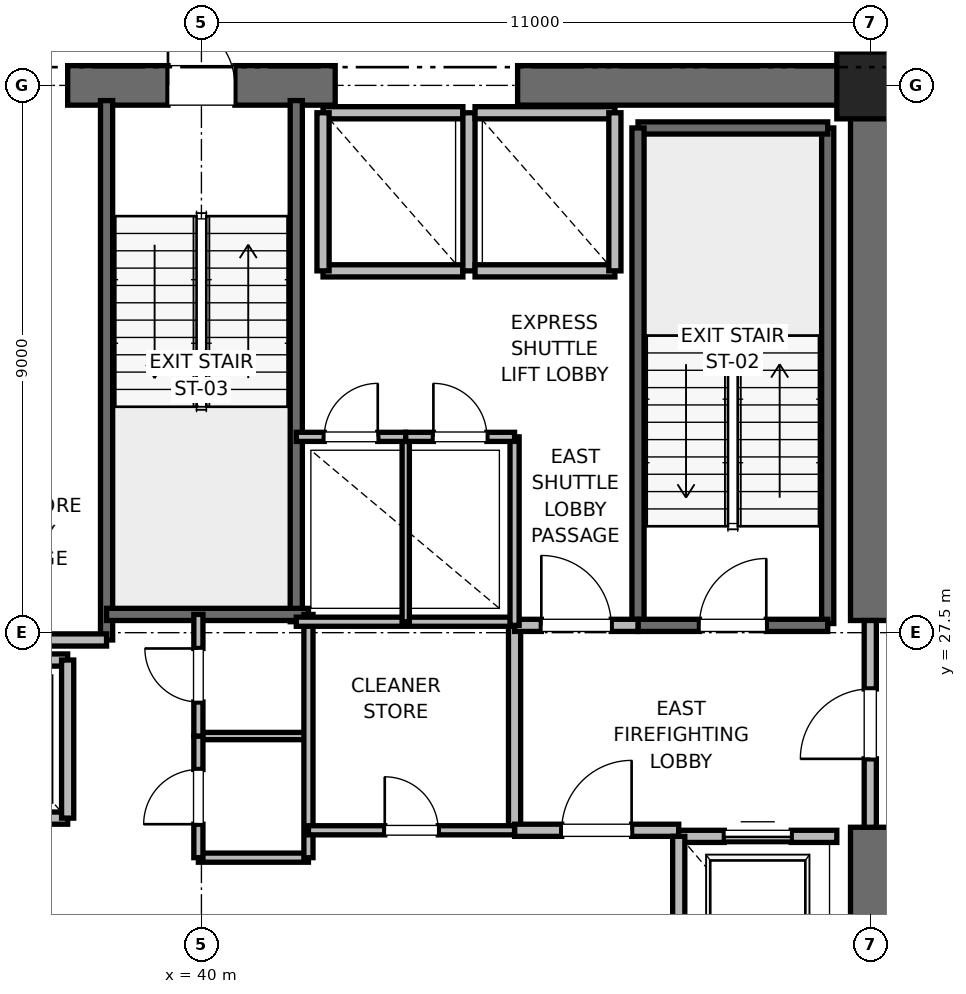
"""IFC4 building model, lengths in metres.
Left out: names, types, materials, properties, quantities, classifications, styles, units other than length and angle.
Written with IfcOpenShell. Run it as: python <this file> out.ifc"""

import sys

from ifc_helpers import new_model, si_unit, direction, frame, frame_2d, origin, origin_2d, place, context, subcontext, project, spatial, rectangle, extrude, element, fill, save


model = new_model("IFC4")
c1 = context("Model", 3, precision=1e-05, world=origin(), true_north=direction((0.0, 1.0)))
c2 = subcontext(c1, "Body", "Model", "MODEL_VIEW")
j1 = project(units=[si_unit("LENGTHUNIT", "METRE"), si_unit("PLANEANGLEUNIT", "RADIAN")], contexts=[c1])
p1 = place(None, origin())
s1 = spatial("IfcSite", under=j1, at=p1, CompositionType="ELEMENT")
p2 = place(p1, origin())
s2 = spatial("IfcBuilding", under=s1, at=p2, CompositionType="ELEMENT")
p3 = place(p2, frame((0.0, 0.0, 83.6)))
s3 = spatial("IfcBuildingStorey", under=s2, at=p3, CompositionType="ELEMENT", Elevation=83.6)
p4 = place(p3, frame((51.0, 36.5, 0.0), z_axis=(0.0, 0.0, 1.0), x_axis=(1.0, 0.0, 0.0)))
e1 = element("IfcColumn", 1, at=p4, inside=s3, PredefinedType="PILASTER", context=c2, shape_type="SweptSolid", body=[
    extrude(rectangle(XDim=1.1, YDim=1.1, at=origin_2d()), origin(), (0.0, 0.0, 1.0), 4.0),
])
p5 = place(p3, frame((37.8, 36.5, 0.0), z_axis=(0.0, 0.0, 1.0), x_axis=(1.0, 0.0, 0.0)))
e2 = element("IfcWall", 2, at=p5, inside=s3, PredefinedType="SHEAR", context=c2, shape_type="SweptSolid", body=[
    extrude(rectangle(XDim=4.4, YDim=0.65, at=frame_2d((2.2, 0.0))), origin(), (0.0, 0.0, 1.0), 3.76),
])
p6 = place(p5, frame((1.65, 0.0, 0.0)))
e3 = element("IfcOpeningElement", 3, at=p6, cuts=e2, PredefinedType="OPENING", context=c2, shape_type="SweptSolid", body=[
    extrude(rectangle(XDim=1.1, YDim=2.15, at=frame_2d((0.55, 1.075))), frame((0.0, 0.325, 0.0), z_axis=(0.0, -1.0, 0.0), x_axis=(1.0, 0.0, 0.0)), (0.0, 0.0, 1.0), 0.65),
])
for number, where, z_axis, x_axis in (
    (4, (45.2, 36.5, 0.0), (0.0, 0.0, 1.0), (1.0, 0.0, 0.0)),
    (5, (51.0, 18.5, 0.0), (0.0, 0.0, 1.0), (0.0, 1.0, 0.0)),
):
    element("IfcWall", number, at=place(p3, frame(where, z_axis=z_axis, x_axis=x_axis)), inside=s3, PredefinedType="SHEAR", context=c2, shape_type="SweptSolid", body=[
        extrude(rectangle(XDim=5.8, YDim=0.65, at=frame_2d((2.9, 0.0))), origin(), (0.0, 0.0, 1.0), 3.76),
    ])
p7 = place(p3, frame((51.0, 27.7, 0.0), z_axis=(0.0, 0.0, 1.0), x_axis=(0.0, 1.0, 0.0)))
e6 = element("IfcWall", 6, at=p7, inside=s3, PredefinedType="SHEAR", context=c2, shape_type="SweptSolid", body=[
    extrude(rectangle(XDim=8.8, YDim=0.65, at=frame_2d((4.4, 0.0))), origin(), (0.0, 0.0, 1.0), 3.76),
])
p8 = place(p3, frame((50.3, 27.65, 0.0), z_axis=(0.0, 0.0, 1.0), x_axis=(0.0, 1.0, 0.0)))
e7 = element("IfcWall", 7, at=p8, inside=s3, PredefinedType="SOLIDWALL", context=c2, shape_type="SweptSolid", body=[
    extrude(rectangle(XDim=8.15, YDim=0.2, at=frame_2d((4.075, 0.0))), origin(), (0.0, 0.0, 1.0), 3.76),
])
p9 = place(p3, frame((47.18, 35.8, 0.0), z_axis=(0.0, 0.0, 1.0), x_axis=(1.0, 0.0, 0.0)))
e8 = element("IfcWall", 8, at=p9, inside=s3, PredefinedType="SOLIDWALL", context=c2, shape_type="SweptSolid", body=[
    extrude(rectangle(XDim=3.12, YDim=0.2, at=frame_2d((1.56, 0.0))), origin(), (0.0, 0.0, 1.0), 3.76),
])
p10 = place(p3, frame((47.18, 27.62, 0.0), z_axis=(0.0, 0.0, 1.0), x_axis=(0.0, 1.0, 0.0)))
e9 = element("IfcWall", 9, at=p10, inside=s3, PredefinedType="SOLIDWALL", context=c2, shape_type="SweptSolid", body=[
    extrude(rectangle(XDim=8.18, YDim=0.2, at=frame_2d((4.09, 0.0))), origin(), (0.0, 0.0, 1.0), 3.76),
])
p11 = place(p3, frame((47.18, 27.62, 0.0), z_axis=(0.0, 0.0, 1.0), x_axis=(1.0, 0.0, 0.0)))
e10 = element("IfcWall", 10, at=p11, inside=s3, PredefinedType="SOLIDWALL", context=c2, shape_type="SweptSolid", body=[
    extrude(rectangle(XDim=3.12, YDim=0.2, at=frame_2d((1.56, 0.0))), origin(), (0.0, 0.0, 1.0), 3.76),
])
p12 = place(p11, frame((1.01, 0.0, 0.0)))
e11 = element("IfcOpeningElement", 11, at=p12, cuts=e10, PredefinedType="OPENING", context=c2, shape_type="SweptSolid", body=[
    extrude(rectangle(XDim=1.1, YDim=2.15, at=frame_2d((0.55, 1.075))), frame((0.0, 0.1, 0.0), z_axis=(0.0, -1.0, 0.0), x_axis=(1.0, 0.0, 0.0)), (0.0, 0.0, 1.0), 0.2),
])
p13 = place(p3, frame((38.44, 27.38, 0.0), z_axis=(0.0, 0.0, 1.0), x_axis=(0.0, 1.0, 0.0)))
e12 = element("IfcWall", 12, at=p13, inside=s3, PredefinedType="SOLIDWALL", context=c2, shape_type="SweptSolid", body=[
    extrude(rectangle(XDim=8.87, YDim=0.2, at=frame_2d((4.435, 0.0))), origin(), (0.0, 0.0, 1.0), 3.76),
])
p14 = place(p3, frame((41.56, 27.68, 0.0), z_axis=(0.0, 0.0, 1.0), x_axis=(0.0, 1.0, 0.0)))
e13 = element("IfcWall", 13, at=p14, inside=s3, PredefinedType="SOLIDWALL", context=c2, shape_type="SweptSolid", body=[
    extrude(rectangle(XDim=8.57, YDim=0.2, at=frame_2d((4.285, 0.0))), origin(), (0.0, 0.0, 1.0), 3.76),
])
p15 = place(p3, frame((38.44, 27.8, 0.0), z_axis=(0.0, 0.0, 1.0), x_axis=(1.0, 0.0, 0.0)))
e14 = element("IfcWall", 14, at=p15, inside=s3, PredefinedType="SOLIDWALL", context=c2, shape_type="SweptSolid", body=[
    extrude(rectangle(XDim=3.32, YDim=0.2, at=frame_2d((1.66, 0.0))), origin(), (0.0, 0.0, 1.0), 3.76),
])
p16 = place(p3, frame((32.82, 27.38, 0.0), z_axis=(0.0, 0.0, 1.0), x_axis=(1.0, 0.0, 0.0)))
e15 = element("IfcWall", 15, at=p16, inside=s3, PredefinedType="PARTITIONING", context=c2, shape_type="SweptSolid", body=[
    extrude(rectangle(XDim=5.62, YDim=0.2, at=frame_2d((2.81, 0.0))), origin(), (0.0, 0.0, 1.0), 3.76),
])
p17 = place(p3, frame((45.15, 24.25, 0.0), z_axis=(0.0, 0.0, 1.0), x_axis=(0.0, 1.0, 0.0)))
e16 = element("IfcWall", 16, at=p17, inside=s3, PredefinedType="PARTITIONING", context=c2, shape_type="SweptSolid", body=[
    extrude(rectangle(XDim=3.37, YDim=0.2, at=frame_2d((1.685, 0.0))), origin(), (0.0, 0.0, 1.0), 3.76),
])
p18 = place(p3, frame((45.15, 24.25, 0.0), z_axis=(0.0, 0.0, 1.0), x_axis=(1.0, 0.0, 0.0)))
e17 = element("IfcWall", 17, at=p18, inside=s3, PredefinedType="PARTITIONING", context=c2, shape_type="SweptSolid", body=[
    extrude(rectangle(XDim=2.7, YDim=0.2, at=frame_2d((1.35, 0.0))), origin(), (0.0, 0.0, 1.0), 3.76),
])
p19 = place(p18, frame((0.775, 0.0, 0.0)))
e18 = element("IfcOpeningElement", 18, at=p19, cuts=e17, PredefinedType="OPENING", context=c2, shape_type="SweptSolid", body=[
    extrude(rectangle(XDim=1.15, YDim=2.2, at=frame_2d((0.575, 1.1))), frame((0.0, 0.1, 0.0), z_axis=(0.0, -1.0, 0.0), x_axis=(1.0, 0.0, 0.0)), (0.0, 0.0, 1.0), 0.2),
])
p20 = place(p3, frame((45.15, 27.62, 0.0), z_axis=(0.0, 0.0, 1.0), x_axis=(1.0, 0.0, 0.0)))
e19 = element("IfcWall", 19, at=p20, inside=s3, PredefinedType="PARTITIONING", context=c2, shape_type="SweptSolid", body=[
    extrude(rectangle(XDim=2.03, YDim=0.2, at=frame_2d((1.015, 0.0))), origin(), (0.0, 0.0, 1.0), 3.76),
])
p21 = place(p20, frame((0.44, 0.0, 0.0)))
e20 = element("IfcOpeningElement", 20, at=p21, cuts=e19, PredefinedType="OPENING", context=c2, shape_type="SweptSolid", body=[
    extrude(rectangle(XDim=1.15, YDim=2.2, at=frame_2d((0.575, 1.1))), frame((0.0, 0.1, 0.0), z_axis=(0.0, -1.0, 0.0), x_axis=(1.0, 0.0, 0.0)), (0.0, 0.0, 1.0), 0.2),
])
p22 = place(p3, frame((51.0, 24.3, 0.0), z_axis=(0.0, 0.0, 1.0), x_axis=(0.0, 1.0, 0.0)))
e21 = element("IfcWall", 21, at=p22, inside=s3, PredefinedType="PARTITIONING", context=c2, shape_type="SweptSolid", body=[
    extrude(rectangle(XDim=3.4, YDim=0.2, at=frame_2d((1.7, 0.0))), origin(), (0.0, 0.0, 1.0), 2.54),
])
p23 = place(p22, frame((1.125, 0.0, 0.0)))
e22 = element("IfcOpeningElement", 22, at=p23, cuts=e21, PredefinedType="OPENING", context=c2, shape_type="SweptSolid", body=[
    extrude(rectangle(XDim=1.15, YDim=2.2, at=frame_2d((0.575, 1.1))), frame((0.0, 0.1, 0.0), z_axis=(0.0, -1.0, 0.0), x_axis=(1.0, 0.0, 0.0)), (0.0, 0.0, 1.0), 0.2),
])
p24 = place(p3, frame((50.45, 24.15, 0.0), z_axis=(0.0, 0.0, 1.0), x_axis=(-1.0, 0.0, 0.0)))
e23 = element("IfcWall", 23, at=p24, inside=s3, PredefinedType="SOLIDWALL", context=c2, shape_type="SweptSolid", body=[
    extrude(rectangle(XDim=2.6, YDim=0.2, at=frame_2d((1.3, 0.0))), origin(), (0.0, 0.0, 1.0), 2.54),
])
p25 = place(p24, frame((0.75, 0.0, 0.0)))
e24 = element("IfcOpeningElement", 24, at=p25, cuts=e23, PredefinedType="OPENING", context=c2, shape_type="SweptSolid", body=[
    extrude(rectangle(XDim=1.1, YDim=2.2, at=frame_2d((0.55, 1.1))), frame((0.0, 0.1, 0.0), z_axis=(0.0, -1.0, 0.0), x_axis=(1.0, 0.0, 0.0)), (0.0, 0.0, 1.0), 0.2),
])
p26 = place(p3, frame((47.85, 24.15, 0.0), z_axis=(0.0, 0.0, 1.0), x_axis=(0.0, -1.0, 0.0)))
e25 = element("IfcWall", 25, at=p26, inside=s3, PredefinedType="SOLIDWALL", context=c2, shape_type="SweptSolid", body=[
    extrude(rectangle(XDim=3.0, YDim=0.2, at=frame_2d((1.5, 0.0))), origin(), (0.0, 0.0, 1.0), 3.76),
])
p27 = place(p3, frame((35.5, 24.45, 0.0), z_axis=(0.0, 0.0, 1.0), x_axis=(1.0, 0.0, 0.0)))
e26 = element("IfcWall", 26, at=p27, inside=s3, PredefinedType="SOLIDWALL", context=c2, shape_type="SweptSolid", body=[
    extrude(rectangle(XDim=2.3, YDim=0.2, at=frame_2d((1.15, 0.0))), origin(), (0.0, 0.0, 1.0), 3.76),
])
p28 = place(p27, frame((0.6, 0.0, 0.0)))
e27 = element("IfcOpeningElement", 27, at=p28, cuts=e26, PredefinedType="OPENING", context=c2, shape_type="SweptSolid", body=[
    extrude(rectangle(XDim=1.1, YDim=2.2, at=frame_2d((0.55, 1.1))), frame((0.0, 0.1, 0.0), z_axis=(0.0, -1.0, 0.0), x_axis=(1.0, 0.0, 0.0)), (0.0, 0.0, 1.0), 0.2),
])
p29 = place(p3, frame((37.8, 27.05, 0.0), z_axis=(0.0, 0.0, 1.0), x_axis=(-1.0, 0.0, 0.0)))
e28 = element("IfcWall", 28, at=p29, inside=s3, PredefinedType="SOLIDWALL", context=c2, shape_type="SweptSolid", body=[
    extrude(rectangle(XDim=2.3, YDim=0.2, at=frame_2d((1.15, 0.0))), origin(), (0.0, 0.0, 1.0), 3.76),
])
p30 = place(p3, frame((37.8, 24.45, 0.0), z_axis=(0.0, 0.0, 1.0), x_axis=(0.0, 1.0, 0.0)))
e29 = element("IfcWall", 29, at=p30, inside=s3, PredefinedType="SOLIDWALL", context=c2, shape_type="SweptSolid", body=[
    extrude(rectangle(XDim=2.6, YDim=0.2, at=frame_2d((1.3, 0.0))), origin(), (0.0, 0.0, 1.0), 3.76),
])
p31 = place(p3, frame((42.0, 33.45, 0.0), z_axis=(0.0, 0.0, 1.0), x_axis=(1.0, 0.0, 0.0)))
e30 = element("IfcWall", 30, at=p31, inside=s3, PredefinedType="SOLIDWALL", context=c2, shape_type="SweptSolid", body=[
    extrude(rectangle(XDim=2.3, YDim=0.2, at=frame_2d((1.15, 0.0))), origin(), (0.0, 0.0, 1.0), 3.76),
])
p32 = place(p3, frame((44.3, 36.05, 0.0), z_axis=(0.0, 0.0, 1.0), x_axis=(-1.0, 0.0, 0.0)))
e31 = element("IfcWall", 31, at=p32, inside=s3, PredefinedType="SOLIDWALL", context=c2, shape_type="SweptSolid", body=[
    extrude(rectangle(XDim=2.3, YDim=0.2, at=frame_2d((1.15, 0.0))), origin(), (0.0, 0.0, 1.0), 2.54),
])
for number, where, z_axis, x_axis in (
    (32, (42.0, 36.05, 0.0), (0.0, 0.0, 1.0), (0.0, -1.0, 0.0)),
    (33, (44.4, 33.45, 0.0), (0.0, 0.0, 1.0), (0.0, 1.0, 0.0)),
):
    element("IfcWall", number, at=place(p3, frame(where, z_axis=z_axis, x_axis=x_axis)), inside=s3, PredefinedType="SOLIDWALL", context=c2, shape_type="SweptSolid", body=[
        extrude(rectangle(XDim=2.6, YDim=0.2, at=frame_2d((1.3, 0.0))), origin(), (0.0, 0.0, 1.0), 2.54),
    ])
p33 = place(p3, frame((44.5, 33.45, 0.0), z_axis=(0.0, 0.0, 1.0), x_axis=(1.0, 0.0, 0.0)))
e34 = element("IfcWall", 34, at=p33, inside=s3, PredefinedType="SOLIDWALL", context=c2, shape_type="SweptSolid", body=[
    extrude(rectangle(XDim=2.3, YDim=0.2, at=frame_2d((1.15, 0.0))), origin(), (0.0, 0.0, 1.0), 3.76),
])
p34 = place(p3, frame((46.8, 36.05, 0.0), z_axis=(0.0, 0.0, 1.0), x_axis=(-1.0, 0.0, 0.0)))
e35 = element("IfcWall", 35, at=p34, inside=s3, PredefinedType="SOLIDWALL", context=c2, shape_type="SweptSolid", body=[
    extrude(rectangle(XDim=2.3, YDim=0.2, at=frame_2d((1.15, 0.0))), origin(), (0.0, 0.0, 1.0), 2.54),
])
p35 = place(p3, frame((46.8, 33.45, 0.0), z_axis=(0.0, 0.0, 1.0), x_axis=(0.0, 1.0, 0.0)))
e36 = element("IfcWall", 36, at=p35, inside=s3, PredefinedType="SOLIDWALL", context=c2, shape_type="SweptSolid", body=[
    extrude(rectangle(XDim=2.6, YDim=0.2, at=frame_2d((1.3, 0.0))), origin(), (0.0, 0.0, 1.0), 3.76),
])
p36 = place(p3, frame((39.95, 23.8, 0.0), z_axis=(0.0, 0.0, 1.0), x_axis=(1.0, 0.0, 0.0)))
e37 = element("IfcWall", 37, at=p36, inside=s3, PredefinedType="PARTITIONING", context=c2, shape_type="SweptSolid", body=[
    extrude(rectangle(XDim=1.81, YDim=0.15, at=frame_2d((0.905, 0.0))), origin(), (0.0, 0.0, 1.0), 2.85),
])
p37 = place(p3, frame((39.95, 25.8, 0.0), z_axis=(0.0, 0.0, 1.0), x_axis=(1.0, 0.0, 0.0)))
e38 = element("IfcWall", 38, at=p37, inside=s3, PredefinedType="PARTITIONING", context=c2, shape_type="SweptSolid", body=[
    extrude(rectangle(XDim=1.81, YDim=0.12, at=frame_2d((0.905, 0.0))), origin(), (0.0, 0.0, 1.0), 2.85),
])
p38 = place(p3, frame((41.76, 23.8, 0.0), z_axis=(0.0, 0.0, 1.0), x_axis=(0.0, 1.0, 0.0)))
e39 = element("IfcWall", 39, at=p38, inside=s3, PredefinedType="PARTITIONING", context=c2, shape_type="SweptSolid", body=[
    extrude(rectangle(XDim=4.0, YDim=0.15, at=frame_2d((2.0, 0.0))), origin(), (0.0, 0.0, 1.0), 2.85),
])
p39 = place(p3, frame((39.95, 23.8, 0.0), z_axis=(0.0, 0.0, 1.0), x_axis=(0.0, 1.0, 0.0)))
e40 = element("IfcWall", 40, at=p39, inside=s3, PredefinedType="PARTITIONING", context=c2, shape_type="SweptSolid", body=[
    extrude(rectangle(XDim=2.0, YDim=0.15, at=frame_2d((1.0, 0.0))), origin(), (0.0, 0.0, 1.0), 2.85),
])
p40 = place(p39, frame((0.55, 0.0, 0.0)))
e41 = element("IfcOpeningElement", 41, at=p40, cuts=e40, PredefinedType="OPENING", context=c2, shape_type="SweptSolid", body=[
    extrude(rectangle(XDim=0.9, YDim=2.1, at=frame_2d((0.45, 1.05))), frame((0.0, 0.075, 0.0), z_axis=(0.0, -1.0, 0.0), x_axis=(1.0, 0.0, 0.0)), (0.0, 0.0, 1.0), 0.15),
])
p41 = place(p3, frame((39.95, 25.8, 0.0), z_axis=(0.0, 0.0, 1.0), x_axis=(0.0, 1.0, 0.0)))
e42 = element("IfcWall", 42, at=p41, inside=s3, PredefinedType="PARTITIONING", context=c2, shape_type="SweptSolid", body=[
    extrude(rectangle(XDim=2.0, YDim=0.15, at=frame_2d((1.0, 0.0))), origin(), (0.0, 0.0, 1.0), 2.85),
])
p42 = place(p41, frame((0.56, 0.0, 0.0)))
e43 = element("IfcOpeningElement", 43, at=p42, cuts=e42, PredefinedType="OPENING", context=c2, shape_type="SweptSolid", body=[
    extrude(rectangle(XDim=0.88, YDim=2.1, at=frame_2d((0.44, 1.05))), frame((0.0, 0.075, 0.0), z_axis=(0.0, -1.0, 0.0), x_axis=(1.0, 0.0, 0.0)), (0.0, 0.0, 1.0), 0.15),
])
p43 = place(p3, frame((41.56, 27.68, 0.0), z_axis=(0.0, 0.0, 1.0), x_axis=(1.0, 0.0, 0.0)))
e44 = element("IfcWall", 44, at=p43, inside=s3, PredefinedType="PARTITIONING", context=c2, shape_type="SweptSolid", body=[
    extrude(rectangle(XDim=3.59, YDim=0.15, at=frame_2d((1.795, 0.0))), origin(), (0.0, 0.0, 1.0), 2.85),
])
p44 = place(p3, frame((41.76, 24.25, 0.0), z_axis=(0.0, 0.0, 1.0), x_axis=(1.0, 0.0, 0.0)))
e45 = element("IfcWall", 45, at=p44, inside=s3, PredefinedType="PARTITIONING", context=c2, shape_type="SweptSolid", body=[
    extrude(rectangle(XDim=3.39, YDim=0.15, at=frame_2d((1.695, 0.0))), origin(), (0.0, 0.0, 1.0), 2.85),
])
p45 = place(p44, frame((1.255, 0.0, 0.0)))
e46 = element("IfcOpeningElement", 46, at=p45, cuts=e45, PredefinedType="OPENING", context=c2, shape_type="SweptSolid", body=[
    extrude(rectangle(XDim=0.88, YDim=2.1, at=frame_2d((0.44, 1.05))), frame((0.0, 0.075, 0.0), z_axis=(0.0, -1.0, 0.0), x_axis=(1.0, 0.0, 0.0)), (0.0, 0.0, 1.0), 0.15),
])
p46 = place(p3, frame((45.15, 27.62, 0.0), z_axis=(0.0, 0.0, 1.0), x_axis=(0.0, 1.0, 0.0)))
e47 = element("IfcWall", 47, at=p46, inside=s3, PredefinedType="PARTITIONING", context=c2, shape_type="SweptSolid", body=[
    extrude(rectangle(XDim=3.1, YDim=0.15, at=frame_2d((1.55, 0.0))), origin(), (0.0, 0.0, 1.0), 2.85),
])
p47 = place(p3, frame((43.36, 27.68, 0.0), z_axis=(0.0, 0.0, 1.0), x_axis=(0.0, 1.0, 0.0)))
e48 = element("IfcWall", 48, at=p47, inside=s3, PredefinedType="PARTITIONING", context=c2, shape_type="SweptSolid", body=[
    extrude(rectangle(XDim=3.04, YDim=0.12, at=frame_2d((1.52, 0.0))), origin(), (0.0, 0.0, 1.0), 2.85),
])
p48 = place(p3, frame((41.56, 30.72, 0.0), z_axis=(0.0, 0.0, 1.0), x_axis=(1.0, 0.0, 0.0)))
e49 = element("IfcWall", 49, at=p48, inside=s3, PredefinedType="PARTITIONING", context=c2, shape_type="SweptSolid", body=[
    extrude(rectangle(XDim=1.8, YDim=0.15, at=frame_2d((0.9, 0.0))), origin(), (0.0, 0.0, 1.0), 2.85),
])
p49 = place(p48, frame((0.46, 0.0, 0.0)))
e50 = element("IfcOpeningElement", 50, at=p49, cuts=e49, PredefinedType="OPENING", context=c2, shape_type="SweptSolid", body=[
    extrude(rectangle(XDim=0.88, YDim=2.1, at=frame_2d((0.44, 1.05))), frame((0.0, 0.075, 0.0), z_axis=(0.0, -1.0, 0.0), x_axis=(1.0, 0.0, 0.0)), (0.0, 0.0, 1.0), 0.15),
])
p50 = place(p3, frame((43.36, 30.72, 0.0), z_axis=(0.0, 0.0, 1.0), x_axis=(1.0, 0.0, 0.0)))
e51 = element("IfcWall", 51, at=p50, inside=s3, PredefinedType="PARTITIONING", context=c2, shape_type="SweptSolid", body=[
    extrude(rectangle(XDim=1.79, YDim=0.15, at=frame_2d((0.895, 0.0))), origin(), (0.0, 0.0, 1.0), 2.85),
])
p51 = place(p50, frame((0.455, 0.0, 0.0)))
e52 = element("IfcOpeningElement", 52, at=p51, cuts=e51, PredefinedType="OPENING", context=c2, shape_type="SweptSolid", body=[
    extrude(rectangle(XDim=0.88, YDim=2.1, at=frame_2d((0.44, 1.05))), frame((0.0, 0.075, 0.0), z_axis=(0.0, -1.0, 0.0), x_axis=(1.0, 0.0, 0.0)), (0.0, 0.0, 1.0), 0.15),
])
p52 = place(p12, origin())
e53 = element("IfcDoor", 53, at=p52, inside=s3, OperationType="SINGLE_SWING_RIGHT", PredefinedType="DOOR", context=c2, shape_type="SweptSolid", body=[
    extrude(rectangle(XDim=1.1, YDim=2.15, at=frame_2d((0.55, 1.075))), frame((0.0, 0.025, 0.0), z_axis=(0.0, -1.0, 0.0), x_axis=(1.0, 0.0, 0.0)), (0.0, 0.0, 1.0), 0.05),
])
fill(e11, e53)
p53 = place(p6, origin())
e54 = element("IfcDoor", 54, at=p53, inside=s3, OperationType="SINGLE_SWING_LEFT", PredefinedType="DOOR", context=c2, shape_type="SweptSolid", body=[
    extrude(rectangle(XDim=1.1, YDim=2.15, at=frame_2d((0.55, 1.075))), frame((0.0, 0.025, 0.0), z_axis=(0.0, -1.0, 0.0), x_axis=(1.0, 0.0, 0.0)), (0.0, 0.0, 1.0), 0.05),
])
fill(e3, e54)
p54 = place(p19, origin())
e55 = element("IfcDoor", 55, at=p54, inside=s3, OperationType="SINGLE_SWING_RIGHT", PredefinedType="DOOR", context=c2, shape_type="SweptSolid", body=[
    extrude(rectangle(XDim=1.15, YDim=2.2, at=frame_2d((0.575, 1.1))), frame((0.0, 0.025, 0.0), z_axis=(0.0, -1.0, 0.0), x_axis=(1.0, 0.0, 0.0)), (0.0, 0.0, 1.0), 0.05),
])
fill(e18, e55)
p55 = place(p21, origin())
e56 = element("IfcDoor", 56, at=p55, inside=s3, OperationType="SINGLE_SWING_LEFT", PredefinedType="DOOR", context=c2, shape_type="SweptSolid", body=[
    extrude(rectangle(XDim=1.15, YDim=2.2, at=frame_2d((0.575, 1.1))), frame((0.0, 0.025, 0.0), z_axis=(0.0, -1.0, 0.0), x_axis=(1.0, 0.0, 0.0)), (0.0, 0.0, 1.0), 0.05),
])
fill(e20, e56)
p56 = place(p23, origin())
e57 = element("IfcDoor", 57, at=p56, inside=s3, OperationType="SINGLE_SWING_LEFT", PredefinedType="DOOR", context=c2, shape_type="SweptSolid", body=[
    extrude(rectangle(XDim=1.15, YDim=2.2, at=frame_2d((0.575, 1.1))), frame((0.0, 0.025, 0.0), z_axis=(0.0, -1.0, 0.0), x_axis=(1.0, 0.0, 0.0)), (0.0, 0.0, 1.0), 0.05),
])
fill(e22, e57)
p57 = place(p25, origin())
e58 = element("IfcDoor", 58, at=p57, inside=s3, OperationType="SLIDING_TO_RIGHT", PredefinedType="DOOR", context=c2, shape_type="SweptSolid", body=[
    extrude(rectangle(XDim=1.1, YDim=2.2, at=frame_2d((0.55, 1.1))), frame((0.0, 0.025, 0.0), z_axis=(0.0, -1.0, 0.0), x_axis=(1.0, 0.0, 0.0)), (0.0, 0.0, 1.0), 0.05),
])
fill(e24, e58)
p58 = place(p40, origin())
e59 = element("IfcDoor", 59, at=p58, inside=s3, OperationType="SINGLE_SWING_LEFT", PredefinedType="DOOR", context=c2, shape_type="SweptSolid", body=[
    extrude(rectangle(XDim=0.9, YDim=2.1, at=frame_2d((0.45, 1.05))), frame((0.0, 0.025, 0.0), z_axis=(0.0, -1.0, 0.0), x_axis=(1.0, 0.0, 0.0)), (0.0, 0.0, 1.0), 0.05),
])
fill(e41, e59)
p59 = place(p42, origin())
e60 = element("IfcDoor", 60, at=p59, inside=s3, OperationType="SINGLE_SWING_RIGHT", PredefinedType="DOOR", context=c2, shape_type="SweptSolid", body=[
    extrude(rectangle(XDim=0.88, YDim=2.1, at=frame_2d((0.44, 1.05))), frame((0.0, 0.025, 0.0), z_axis=(0.0, -1.0, 0.0), x_axis=(1.0, 0.0, 0.0)), (0.0, 0.0, 1.0), 0.05),
])
fill(e43, e60)
p60 = place(p45, origin())
e61 = element("IfcDoor", 61, at=p60, inside=s3, OperationType="SINGLE_SWING_LEFT", PredefinedType="DOOR", context=c2, shape_type="SweptSolid", body=[
    extrude(rectangle(XDim=0.88, YDim=2.1, at=frame_2d((0.44, 1.05))), frame((0.0, 0.025, 0.0), z_axis=(0.0, -1.0, 0.0), x_axis=(1.0, 0.0, 0.0)), (0.0, 0.0, 1.0), 0.05),
])
fill(e46, e61)
p61 = place(p49, origin())
e62 = element("IfcDoor", 62, at=p61, inside=s3, OperationType="SINGLE_SWING_RIGHT", PredefinedType="DOOR", context=c2, shape_type="SweptSolid", body=[
    extrude(rectangle(XDim=0.88, YDim=2.1, at=frame_2d((0.44, 1.05))), frame((0.0, 0.025, 0.0), z_axis=(0.0, -1.0, 0.0), x_axis=(1.0, 0.0, 0.0)), (0.0, 0.0, 1.0), 0.05),
])
fill(e50, e62)
p62 = place(p51, origin())
e63 = element("IfcDoor", 63, at=p62, inside=s3, OperationType="SINGLE_SWING_LEFT", PredefinedType="DOOR", context=c2, shape_type="SweptSolid", body=[
    extrude(rectangle(XDim=0.88, YDim=2.1, at=frame_2d((0.44, 1.05))), frame((0.0, 0.025, 0.0), z_axis=(0.0, -1.0, 0.0), x_axis=(1.0, 0.0, 0.0)), (0.0, 0.0, 1.0), 0.05),
])
fill(e52, e63)
save(model, sys.argv[1])
